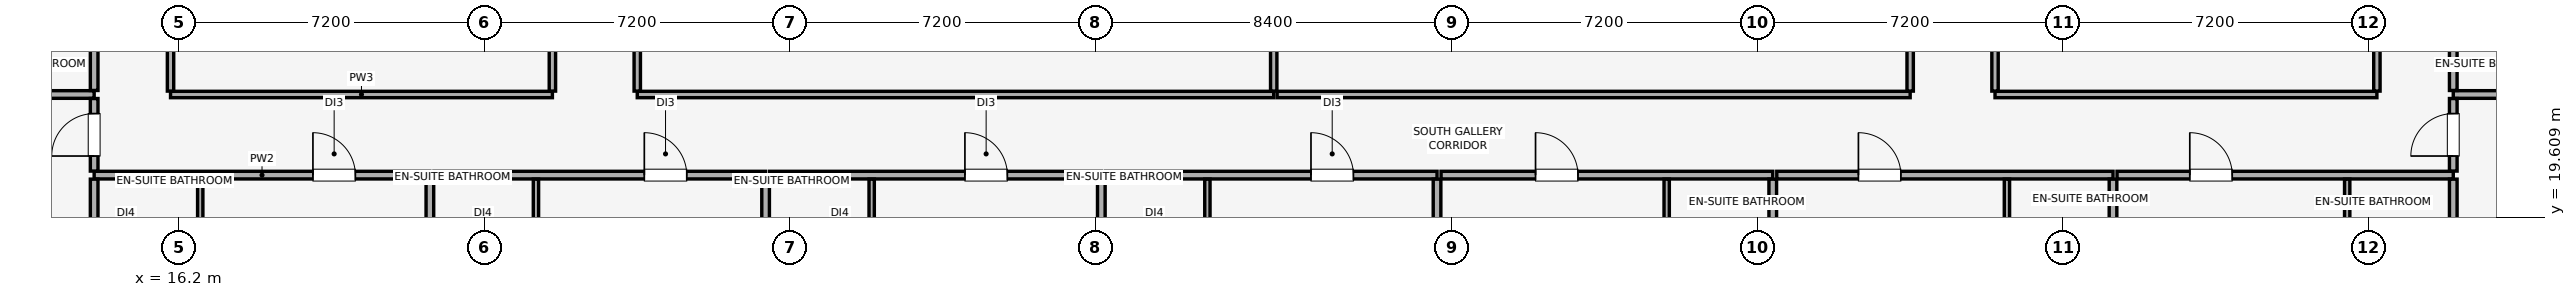
"""IFC4 building model, lengths in metres.
Left out: names, types, materials, properties, quantities, classifications, styles, units other than length and angle.
Written with IfcOpenShell. Run it as: python <this file> out.ifc"""

import sys

from ifc_helpers import new_model, si_unit, direction, frame, frame_2d, origin, place, context, subcontext, project, spatial, rectangle, extrude, element, fill, save


model = new_model("IFC4")
c1 = context("Model", 3, precision=1e-05, world=origin(), true_north=direction((0.0, 1.0)))
c2 = subcontext(c1, "Body", "Model", "MODEL_VIEW")
j1 = project(units=[si_unit("LENGTHUNIT", "METRE"), si_unit("PLANEANGLEUNIT", "RADIAN")], contexts=[c1])
p1 = place(None, origin())
s1 = spatial("IfcSite", under=j1, at=p1, CompositionType="ELEMENT")
p2 = place(p1, origin())
s2 = spatial("IfcBuilding", under=s1, at=p2, CompositionType="ELEMENT")
p3 = place(p2, frame((0.0, 0.0, 180.95)))
s3 = spatial("IfcBuildingStorey", under=s2, at=p3, CompositionType="ELEMENT", Elevation=180.95)
p4 = place(p3, frame((14.2, 20.6, 0.0), z_axis=(0.0, 0.0, 1.0), x_axis=(1.0, 0.0, 0.0)))
e1 = element("IfcWall", 1, at=p4, inside=s3, PredefinedType="PARTITIONING", context=c2, shape_type="SweptSolid", body=[
    extrude(rectangle(XDim=7.912, YDim=0.18, at=frame_2d((3.956, 0.0))), origin(), (0.0, 0.0, 1.0), 3.45),
])
p5 = place(p4, frame((5.156, 0.0, 0.0)))
e2 = element("IfcOpeningElement", 2, at=p5, cuts=e1, PredefinedType="OPENING", context=c2, shape_type="SweptSolid", body=[
    extrude(rectangle(XDim=1.0, YDim=2.15, at=frame_2d((0.5, 1.075))), frame((0.0, 0.1, 0.0), z_axis=(0.0, -1.0, 0.0), x_axis=(1.0, 0.0, 0.0)), (0.0, 0.0, 1.0), 0.2),
])
for number, where, z_axis, x_axis in (
    (3, (14.2, 3.15, 0.0), (0.0, 0.0, 1.0), (0.0, 1.0, 0.0)),
    (4, (22.112, 3.15, 0.0), (0.0, 0.0, 1.0), (0.0, 1.0, 0.0)),
):
    element("IfcWall", number, at=place(p3, frame(where, z_axis=z_axis, x_axis=x_axis)), inside=s3, PredefinedType="PARTITIONING", context=c2, shape_type="SweptSolid", body=[
        extrude(rectangle(XDim=17.355, YDim=0.18, at=frame_2d((8.677, 0.0))), origin(), (0.0, 0.0, 1.0), 3.45),
    ])
p6 = place(p3, frame((16.7, 18.117, 0.0), z_axis=(0.0, 0.0, 1.0), x_axis=(0.0, 1.0, 0.0)))
e5 = element("IfcWall", 5, at=p6, inside=s3, PredefinedType="PARTITIONING", context=c2, shape_type="SweptSolid", body=[
    extrude(rectangle(XDim=2.387, YDim=0.125, at=frame_2d((1.194, 0.0))), origin(), (0.0, 0.0, 1.0), 3.45),
])
p7 = place(p3, frame((22.207, 20.6, 0.0), z_axis=(0.0, 0.0, 1.0), x_axis=(1.0, 0.0, 0.0)))
e6 = element("IfcWall", 6, at=p7, inside=s3, PredefinedType="PARTITIONING", context=c2, shape_type="SweptSolid", body=[
    extrude(rectangle(XDim=7.817, YDim=0.18, at=frame_2d((3.909, 0.0))), origin(), (0.0, 0.0, 1.0), 3.45),
])
p8 = place(p7, frame((4.959, 0.0, 0.0)))
e7 = element("IfcOpeningElement", 7, at=p8, cuts=e6, PredefinedType="OPENING", context=c2, shape_type="SweptSolid", body=[
    extrude(rectangle(XDim=1.0, YDim=2.15, at=frame_2d((0.5, 1.075))), frame((0.0, 0.1, 0.0), z_axis=(0.0, -1.0, 0.0), x_axis=(1.0, 0.0, 0.0)), (0.0, 0.0, 1.0), 0.2),
])
p9 = place(p3, frame((30.025, 3.15, 0.0), z_axis=(0.0, 0.0, 1.0), x_axis=(0.0, 1.0, 0.0)))
e8 = element("IfcWall", 8, at=p9, inside=s3, PredefinedType="PARTITIONING", context=c2, shape_type="SweptSolid", body=[
    extrude(rectangle(XDim=17.355, YDim=0.18, at=frame_2d((8.677, 0.0))), origin(), (0.0, 0.0, 1.0), 3.45),
])
p10 = place(p3, frame((24.612, 18.117, 0.0), z_axis=(0.0, 0.0, 1.0), x_axis=(0.0, 1.0, 0.0)))
e9 = element("IfcWall", 9, at=p10, inside=s3, PredefinedType="PARTITIONING", context=c2, shape_type="SweptSolid", body=[
    extrude(rectangle(XDim=2.387, YDim=0.125, at=frame_2d((1.194, 0.0))), origin(), (0.0, 0.0, 1.0), 3.45),
])
p11 = place(p3, frame((30.12, 20.6, 0.0), z_axis=(0.0, 0.0, 1.0), x_axis=(1.0, 0.0, 0.0)))
e10 = element("IfcWall", 10, at=p11, inside=s3, PredefinedType="PARTITIONING", context=c2, shape_type="SweptSolid", body=[
    extrude(rectangle(XDim=7.817, YDim=0.18, at=frame_2d((3.909, 0.0))), origin(), (0.0, 0.0, 1.0), 3.45),
])
p12 = place(p11, frame((4.603, 0.0, 0.0)))
e11 = element("IfcOpeningElement", 11, at=p12, cuts=e10, PredefinedType="OPENING", context=c2, shape_type="SweptSolid", body=[
    extrude(rectangle(XDim=1.0, YDim=2.15, at=frame_2d((0.5, 1.075))), frame((0.0, 0.1, 0.0), z_axis=(0.0, -1.0, 0.0), x_axis=(1.0, 0.0, 0.0)), (0.0, 0.0, 1.0), 0.2),
])
p13 = place(p3, frame((37.937, 3.15, 0.0), z_axis=(0.0, 0.0, 1.0), x_axis=(0.0, 1.0, 0.0)))
e12 = element("IfcWall", 12, at=p13, inside=s3, PredefinedType="PARTITIONING", context=c2, shape_type="SweptSolid", body=[
    extrude(rectangle(XDim=17.355, YDim=0.18, at=frame_2d((8.677, 0.0))), origin(), (0.0, 0.0, 1.0), 2.85),
])
p14 = place(p3, frame((32.525, 18.117, 0.0), z_axis=(0.0, 0.0, 1.0), x_axis=(0.0, 1.0, 0.0)))
e13 = element("IfcWall", 13, at=p14, inside=s3, PredefinedType="PARTITIONING", context=c2, shape_type="SweptSolid", body=[
    extrude(rectangle(XDim=2.387, YDim=0.125, at=frame_2d((1.194, 0.0))), origin(), (0.0, 0.0, 1.0), 3.45),
])
p15 = place(p3, frame((38.032, 20.6, 0.0), z_axis=(0.0, 0.0, 1.0), x_axis=(1.0, 0.0, 0.0)))
e14 = element("IfcWall", 14, at=p15, inside=s3, PredefinedType="PARTITIONING", context=c2, shape_type="SweptSolid", body=[
    extrude(rectangle(XDim=7.817, YDim=0.18, at=frame_2d((3.909, 0.0))), origin(), (0.0, 0.0, 1.0), 3.45),
])
p16 = place(p15, frame((4.847, 0.0, 0.0)))
e15 = element("IfcOpeningElement", 15, at=p16, cuts=e14, PredefinedType="OPENING", context=c2, shape_type="SweptSolid", body=[
    extrude(rectangle(XDim=1.0, YDim=2.15, at=frame_2d((0.5, 1.075))), frame((0.0, 0.1, 0.0), z_axis=(0.0, -1.0, 0.0), x_axis=(1.0, 0.0, 0.0)), (0.0, 0.0, 1.0), 0.2),
])
p17 = place(p3, frame((45.849, 3.15, 0.0), z_axis=(0.0, 0.0, 1.0), x_axis=(0.0, 1.0, 0.0)))
e16 = element("IfcWall", 16, at=p17, inside=s3, PredefinedType="PARTITIONING", context=c2, shape_type="SweptSolid", body=[
    extrude(rectangle(XDim=17.355, YDim=0.18, at=frame_2d((8.677, 0.0))), origin(), (0.0, 0.0, 1.0), 3.45),
])
p18 = place(p3, frame((40.437, 18.117, 0.0), z_axis=(0.0, 0.0, 1.0), x_axis=(0.0, 1.0, 0.0)))
e17 = element("IfcWall", 17, at=p18, inside=s3, PredefinedType="PARTITIONING", context=c2, shape_type="SweptSolid", body=[
    extrude(rectangle(XDim=2.387, YDim=0.125, at=frame_2d((1.194, 0.0))), origin(), (0.0, 0.0, 1.0), 3.45),
])
p19 = place(p3, frame((45.944, 20.6, 0.0), z_axis=(0.0, 0.0, 1.0), x_axis=(1.0, 0.0, 0.0)))
e18 = element("IfcWall", 18, at=p19, inside=s3, PredefinedType="PARTITIONING", context=c2, shape_type="SweptSolid", body=[
    extrude(rectangle(XDim=7.817, YDim=0.18, at=frame_2d((3.909, 0.0))), origin(), (0.0, 0.0, 1.0), 3.45),
])
p20 = place(p19, frame((2.227, 0.0, 0.0)))
e19 = element("IfcOpeningElement", 19, at=p20, cuts=e18, PredefinedType="OPENING", context=c2, shape_type="SweptSolid", body=[
    extrude(rectangle(XDim=1.0, YDim=2.15, at=frame_2d((0.5, 1.075))), frame((0.0, 0.1, 0.0), z_axis=(0.0, -1.0, 0.0), x_axis=(1.0, 0.0, 0.0)), (0.0, 0.0, 1.0), 0.2),
])
p21 = place(p3, frame((53.761, 3.15, 0.0), z_axis=(0.0, 0.0, 1.0), x_axis=(0.0, 1.0, 0.0)))
e20 = element("IfcWall", 20, at=p21, inside=s3, PredefinedType="PARTITIONING", context=c2, shape_type="SweptSolid", body=[
    extrude(rectangle(XDim=17.355, YDim=0.18, at=frame_2d((8.677, 0.0))), origin(), (0.0, 0.0, 1.0), 3.45),
])
p22 = place(p3, frame((51.261, 18.117, 0.0), z_axis=(0.0, 0.0, 1.0), x_axis=(0.0, 1.0, 0.0)))
e21 = element("IfcWall", 21, at=p22, inside=s3, PredefinedType="PARTITIONING", context=c2, shape_type="SweptSolid", body=[
    extrude(rectangle(XDim=2.387, YDim=0.125, at=frame_2d((1.194, 0.0))), origin(), (0.0, 0.0, 1.0), 3.45),
])
p23 = place(p3, frame((53.856, 20.6, 0.0), z_axis=(0.0, 0.0, 1.0), x_axis=(1.0, 0.0, 0.0)))
e22 = element("IfcWall", 22, at=p23, inside=s3, PredefinedType="PARTITIONING", context=c2, shape_type="SweptSolid", body=[
    extrude(rectangle(XDim=7.924, YDim=0.18, at=frame_2d((3.962, 0.0))), origin(), (0.0, 0.0, 1.0), 3.45),
])
p24 = place(p23, frame((1.924, 0.0, 0.0)))
e23 = element("IfcOpeningElement", 23, at=p24, cuts=e22, PredefinedType="OPENING", context=c2, shape_type="SweptSolid", body=[
    extrude(rectangle(XDim=1.0, YDim=2.15, at=frame_2d((0.5, 1.075))), frame((0.0, 0.1, 0.0), z_axis=(0.0, -1.0, 0.0), x_axis=(1.0, 0.0, 0.0)), (0.0, 0.0, 1.0), 0.2),
])
p25 = place(p3, frame((61.781, 3.15, 0.0), z_axis=(0.0, 0.0, 1.0), x_axis=(0.0, 1.0, 0.0)))
e24 = element("IfcWall", 24, at=p25, inside=s3, PredefinedType="PARTITIONING", context=c2, shape_type="SweptSolid", body=[
    extrude(rectangle(XDim=17.355, YDim=0.18, at=frame_2d((8.677, 0.0))), origin(), (0.0, 0.0, 1.0), 3.45),
])
p26 = place(p3, frame((59.281, 18.117, 0.0), z_axis=(0.0, 0.0, 1.0), x_axis=(0.0, 1.0, 0.0)))
e25 = element("IfcWall", 25, at=p26, inside=s3, PredefinedType="PARTITIONING", context=c2, shape_type="SweptSolid", body=[
    extrude(rectangle(XDim=2.387, YDim=0.125, at=frame_2d((1.194, 0.0))), origin(), (0.0, 0.0, 1.0), 3.45),
])
p27 = place(p3, frame((61.876, 20.6, 0.0), z_axis=(0.0, 0.0, 1.0), x_axis=(1.0, 0.0, 0.0)))
e26 = element("IfcWall", 26, at=p27, inside=s3, PredefinedType="PARTITIONING", context=c2, shape_type="SweptSolid", body=[
    extrude(rectangle(XDim=7.924, YDim=0.18, at=frame_2d((3.962, 0.0))), origin(), (0.0, 0.0, 1.0), 3.45),
])
p28 = place(p27, frame((1.715, 0.0, 0.0)))
e27 = element("IfcOpeningElement", 27, at=p28, cuts=e26, PredefinedType="OPENING", context=c2, shape_type="SweptSolid", body=[
    extrude(rectangle(XDim=1.0, YDim=2.15, at=frame_2d((0.5, 1.075))), frame((0.0, 0.1, 0.0), z_axis=(0.0, -1.0, 0.0), x_axis=(1.0, 0.0, 0.0)), (0.0, 0.0, 1.0), 0.2),
])
p29 = place(p3, frame((69.8, 3.15, 0.0), z_axis=(0.0, 0.0, 1.0), x_axis=(0.0, 1.0, 0.0)))
e28 = element("IfcWall", 28, at=p29, inside=s3, PredefinedType="PARTITIONING", context=c2, shape_type="SweptSolid", body=[
    extrude(rectangle(XDim=17.355, YDim=0.18, at=frame_2d((8.677, 0.0))), origin(), (0.0, 0.0, 1.0), 3.45),
])
p30 = place(p3, frame((67.3, 18.117, 0.0), z_axis=(0.0, 0.0, 1.0), x_axis=(0.0, 1.0, 0.0)))
e29 = element("IfcWall", 29, at=p30, inside=s3, PredefinedType="PARTITIONING", context=c2, shape_type="SweptSolid", body=[
    extrude(rectangle(XDim=2.387, YDim=0.125, at=frame_2d((1.194, 0.0))), origin(), (0.0, 0.0, 1.0), 3.45),
])
p31 = place(p3, frame((3.15, 22.5, 0.0), z_axis=(0.0, 0.0, 1.0), x_axis=(1.0, 0.0, 0.0)))
e30 = element("IfcWall", 30, at=p31, inside=s3, PredefinedType="PARTITIONING", context=c2, shape_type="SweptSolid", body=[
    extrude(rectangle(XDim=11.05, YDim=0.18, at=frame_2d((5.525, 0.0))), origin(), (0.0, 0.0, 1.0), 3.45),
])
p32 = place(p3, frame((14.2, 20.695, 0.0), z_axis=(0.0, 0.0, 1.0), x_axis=(0.0, 1.0, 0.0)))
e31 = element("IfcWall", 31, at=p32, inside=s3, PredefinedType="PARTITIONING", context=c2, shape_type="SweptSolid", body=[
    extrude(rectangle(XDim=1.71, YDim=0.18, at=frame_2d((0.855, 0.0))), origin(), (0.0, 0.0, 1.0), 3.45),
])
p33 = place(p32, frame((0.355, 0.0, 0.0)))
e32 = element("IfcOpeningElement", 32, at=p33, cuts=e31, PredefinedType="OPENING", context=c2, shape_type="SweptSolid", body=[
    extrude(rectangle(XDim=1.0, YDim=2.15, at=frame_2d((0.5, 1.075))), frame((0.0, 0.1, 0.0), z_axis=(0.0, -1.0, 0.0), x_axis=(1.0, 0.0, 0.0)), (0.0, 0.0, 1.0), 0.2),
])
p34 = place(p3, frame((14.2, 22.595, 0.0), z_axis=(0.0, 0.0, 1.0), x_axis=(0.0, 1.0, 0.0)))
e33 = element("IfcWall", 33, at=p34, inside=s3, PredefinedType="PARTITIONING", context=c2, shape_type="SweptSolid", body=[
    extrude(rectangle(XDim=6.71, YDim=0.18, at=frame_2d((3.355, 0.0))), origin(), (0.0, 0.0, 1.0), 3.45),
])
p35 = place(p34, frame((3.94, 0.0, 0.0)))
e34 = element("IfcOpeningElement", 34, at=p35, cuts=e33, PredefinedType="OPENING", context=c2, shape_type="SweptSolid", body=[
    extrude(rectangle(XDim=1.0, YDim=2.15, at=frame_2d((0.5, 1.075))), frame((0.0, 0.1, 0.0), z_axis=(0.0, -1.0, 0.0), x_axis=(1.0, 0.0, 0.0)), (0.0, 0.0, 1.0), 0.2),
])
p36 = place(p3, frame((69.8, 22.5, 0.0), z_axis=(0.0, 0.0, 1.0), x_axis=(1.0, 0.0, 0.0)))
e35 = element("IfcWall", 35, at=p36, inside=s3, PredefinedType="PARTITIONING", context=c2, shape_type="SweptSolid", body=[
    extrude(rectangle(XDim=11.05, YDim=0.18, at=frame_2d((5.525, 0.0))), origin(), (0.0, 0.0, 1.0), 3.45),
])
p37 = place(p3, frame((69.8, 20.695, 0.0), z_axis=(0.0, 0.0, 1.0), x_axis=(0.0, 1.0, 0.0)))
e36 = element("IfcWall", 36, at=p37, inside=s3, PredefinedType="PARTITIONING", context=c2, shape_type="SweptSolid", body=[
    extrude(rectangle(XDim=1.71, YDim=0.18, at=frame_2d((0.855, 0.0))), origin(), (0.0, 0.0, 1.0), 3.45),
])
p38 = place(p37, frame((0.355, 0.0, 0.0)))
e37 = element("IfcOpeningElement", 37, at=p38, cuts=e36, PredefinedType="OPENING", context=c2, shape_type="SweptSolid", body=[
    extrude(rectangle(XDim=1.0, YDim=2.15, at=frame_2d((0.5, 1.075))), frame((0.0, 0.1, 0.0), z_axis=(0.0, -1.0, 0.0), x_axis=(1.0, 0.0, 0.0)), (0.0, 0.0, 1.0), 0.2),
])
p39 = place(p3, frame((69.8, 22.595, 0.0), z_axis=(0.0, 0.0, 1.0), x_axis=(0.0, 1.0, 0.0)))
e38 = element("IfcWall", 38, at=p39, inside=s3, PredefinedType="PARTITIONING", context=c2, shape_type="SweptSolid", body=[
    extrude(rectangle(XDim=6.71, YDim=0.18, at=frame_2d((3.355, 0.0))), origin(), (0.0, 0.0, 1.0), 3.45),
])
p40 = place(p39, frame((3.94, 0.0, 0.0)))
e39 = element("IfcOpeningElement", 39, at=p40, cuts=e38, PredefinedType="OPENING", context=c2, shape_type="SweptSolid", body=[
    extrude(rectangle(XDim=1.0, YDim=2.15, at=frame_2d((0.5, 1.075))), frame((0.0, 0.1, 0.0), z_axis=(0.0, -1.0, 0.0), x_axis=(1.0, 0.0, 0.0)), (0.0, 0.0, 1.0), 0.2),
])
p41 = place(p3, frame((16.0, 22.5, 0.0), z_axis=(0.0, 0.0, 1.0), x_axis=(1.0, 0.0, 0.0)))
e40 = element("IfcWall", 40, at=p41, inside=s3, PredefinedType="PARTITIONING", context=c2, shape_type="SweptSolid", body=[
    extrude(rectangle(XDim=9.0, YDim=0.15, at=frame_2d((4.5, 0.0))), origin(), (0.0, 0.0, 1.0), 3.45),
])
p42 = place(p3, frame((16.0, 22.58, 0.0), z_axis=(0.0, 0.0, 1.0), x_axis=(0.0, 1.0, 0.0)))
e41 = element("IfcWall", 41, at=p42, inside=s3, PredefinedType="PARTITIONING", context=c2, shape_type="SweptSolid", body=[
    extrude(rectangle(XDim=4.54, YDim=0.15, at=frame_2d((2.27, 0.0))), origin(), (0.0, 0.0, 1.0), 2.95),
])
p43 = place(p3, frame((25.0, 22.58, 0.0), z_axis=(0.0, 0.0, 1.0), x_axis=(0.0, 1.0, 0.0)))
e42 = element("IfcWall", 42, at=p43, inside=s3, PredefinedType="PARTITIONING", context=c2, shape_type="SweptSolid", body=[
    extrude(rectangle(XDim=4.54, YDim=0.15, at=frame_2d((2.27, 0.0))), origin(), (0.0, 0.0, 1.0), 3.45),
])
p44 = place(p3, frame((27.0, 22.5, 0.0), z_axis=(0.0, 0.0, 1.0), x_axis=(1.0, 0.0, 0.0)))
e43 = element("IfcWall", 43, at=p44, inside=s3, PredefinedType="PARTITIONING", context=c2, shape_type="SweptSolid", body=[
    extrude(rectangle(XDim=15.0, YDim=0.15, at=frame_2d((7.5, 0.0))), origin(), (0.0, 0.0, 1.0), 3.45),
])
for number, where, z_axis, x_axis in (
    (44, (27.0, 22.58, 0.0), (0.0, 0.0, 1.0), (0.0, 1.0, 0.0)),
    (45, (42.0, 22.58, 0.0), (0.0, 0.0, 1.0), (0.0, 1.0, 0.0)),
):
    element("IfcWall", number, at=place(p3, frame(where, z_axis=z_axis, x_axis=x_axis)), inside=s3, PredefinedType="PARTITIONING", context=c2, shape_type="SweptSolid", body=[
        extrude(rectangle(XDim=4.54, YDim=0.15, at=frame_2d((2.27, 0.0))), origin(), (0.0, 0.0, 1.0), 2.95),
    ])
p45 = place(p3, frame((42.08, 22.5, 0.0), z_axis=(0.0, 0.0, 1.0), x_axis=(1.0, 0.0, 0.0)))
e46 = element("IfcWall", 46, at=p45, inside=s3, PredefinedType="PARTITIONING", context=c2, shape_type="SweptSolid", body=[
    extrude(rectangle(XDim=14.92, YDim=0.15, at=frame_2d((7.46, 0.0))), origin(), (0.0, 0.0, 1.0), 3.45),
])
p46 = place(p3, frame((57.0, 22.58, 0.0), z_axis=(0.0, 0.0, 1.0), x_axis=(0.0, 1.0, 0.0)))
e47 = element("IfcWall", 47, at=p46, inside=s3, PredefinedType="PARTITIONING", context=c2, shape_type="SweptSolid", body=[
    extrude(rectangle(XDim=4.54, YDim=0.15, at=frame_2d((2.27, 0.0))), origin(), (0.0, 0.0, 1.0), 2.95),
])
p47 = place(p3, frame((59.0, 22.5, 0.0), z_axis=(0.0, 0.0, 1.0), x_axis=(1.0, 0.0, 0.0)))
e48 = element("IfcWall", 48, at=p47, inside=s3, PredefinedType="PARTITIONING", context=c2, shape_type="SweptSolid", body=[
    extrude(rectangle(XDim=9.0, YDim=0.15, at=frame_2d((4.5, 0.0))), origin(), (0.0, 0.0, 1.0), 3.45),
])
p48 = place(p3, frame((59.0, 22.58, 0.0), z_axis=(0.0, 0.0, 1.0), x_axis=(0.0, 1.0, 0.0)))
e49 = element("IfcWall", 49, at=p48, inside=s3, PredefinedType="PARTITIONING", context=c2, shape_type="SweptSolid", body=[
    extrude(rectangle(XDim=4.54, YDim=0.15, at=frame_2d((2.27, 0.0))), origin(), (0.0, 0.0, 1.0), 3.45),
])
p49 = place(p3, frame((68.0, 22.58, 0.0), z_axis=(0.0, 0.0, 1.0), x_axis=(0.0, 1.0, 0.0)))
e50 = element("IfcWall", 50, at=p49, inside=s3, PredefinedType="PARTITIONING", context=c2, shape_type="SweptSolid", body=[
    extrude(rectangle(XDim=4.54, YDim=0.15, at=frame_2d((2.27, 0.0))), origin(), (0.0, 0.0, 1.0), 2.95),
])
p50 = place(p5, origin())
e51 = element("IfcDoor", 51, at=p50, inside=s3, OperationType="SINGLE_SWING_LEFT", PredefinedType="DOOR", context=c2, shape_type="SweptSolid", body=[
    extrude(rectangle(XDim=1.0, YDim=2.15, at=frame_2d((0.5, 1.075))), frame((0.0, 0.025, 0.0), z_axis=(0.0, -1.0, 0.0), x_axis=(1.0, 0.0, 0.0)), (0.0, 0.0, 1.0), 0.05),
])
fill(e2, e51)
p51 = place(p8, origin())
e52 = element("IfcDoor", 52, at=p51, inside=s3, OperationType="SINGLE_SWING_LEFT", PredefinedType="DOOR", context=c2, shape_type="SweptSolid", body=[
    extrude(rectangle(XDim=1.0, YDim=2.15, at=frame_2d((0.5, 1.075))), frame((0.0, 0.025, 0.0), z_axis=(0.0, -1.0, 0.0), x_axis=(1.0, 0.0, 0.0)), (0.0, 0.0, 1.0), 0.05),
])
fill(e7, e52)
p52 = place(p12, origin())
e53 = element("IfcDoor", 53, at=p52, inside=s3, OperationType="SINGLE_SWING_LEFT", PredefinedType="DOOR", context=c2, shape_type="SweptSolid", body=[
    extrude(rectangle(XDim=1.0, YDim=2.15, at=frame_2d((0.5, 1.075))), frame((0.0, 0.025, 0.0), z_axis=(0.0, -1.0, 0.0), x_axis=(1.0, 0.0, 0.0)), (0.0, 0.0, 1.0), 0.05),
])
fill(e11, e53)
p53 = place(p16, origin())
e54 = element("IfcDoor", 54, at=p53, inside=s3, OperationType="SINGLE_SWING_LEFT", PredefinedType="DOOR", context=c2, shape_type="SweptSolid", body=[
    extrude(rectangle(XDim=1.0, YDim=2.15, at=frame_2d((0.5, 1.075))), frame((0.0, 0.025, 0.0), z_axis=(0.0, -1.0, 0.0), x_axis=(1.0, 0.0, 0.0)), (0.0, 0.0, 1.0), 0.05),
])
fill(e15, e54)
p54 = place(p20, origin())
e55 = element("IfcDoor", 55, at=p54, inside=s3, OperationType="SINGLE_SWING_LEFT", PredefinedType="DOOR", context=c2, shape_type="SweptSolid", body=[
    extrude(rectangle(XDim=1.0, YDim=2.15, at=frame_2d((0.5, 1.075))), frame((0.0, 0.025, 0.0), z_axis=(0.0, -1.0, 0.0), x_axis=(1.0, 0.0, 0.0)), (0.0, 0.0, 1.0), 0.05),
])
fill(e19, e55)
p55 = place(p24, origin())
e56 = element("IfcDoor", 56, at=p55, inside=s3, OperationType="SINGLE_SWING_LEFT", PredefinedType="DOOR", context=c2, shape_type="SweptSolid", body=[
    extrude(rectangle(XDim=1.0, YDim=2.15, at=frame_2d((0.5, 1.075))), frame((0.0, 0.025, 0.0), z_axis=(0.0, -1.0, 0.0), x_axis=(1.0, 0.0, 0.0)), (0.0, 0.0, 1.0), 0.05),
])
fill(e23, e56)
p56 = place(p28, origin())
e57 = element("IfcDoor", 57, at=p56, inside=s3, OperationType="SINGLE_SWING_LEFT", PredefinedType="DOOR", context=c2, shape_type="SweptSolid", body=[
    extrude(rectangle(XDim=1.0, YDim=2.15, at=frame_2d((0.5, 1.075))), frame((0.0, 0.025, 0.0), z_axis=(0.0, -1.0, 0.0), x_axis=(1.0, 0.0, 0.0)), (0.0, 0.0, 1.0), 0.05),
])
fill(e27, e57)
p57 = place(p33, origin())
e58 = element("IfcDoor", 58, at=p57, inside=s3, OperationType="SINGLE_SWING_LEFT", PredefinedType="DOOR", context=c2, shape_type="SweptSolid", body=[
    extrude(rectangle(XDim=1.0, YDim=2.15, at=frame_2d((0.5, 1.075))), frame((0.0, 0.025, 0.0), z_axis=(0.0, -1.0, 0.0), x_axis=(1.0, 0.0, 0.0)), (0.0, 0.0, 1.0), 0.05),
])
fill(e32, e58)
p58 = place(p38, origin())
e59 = element("IfcDoor", 59, at=p58, inside=s3, OperationType="SINGLE_SWING_LEFT", PredefinedType="DOOR", context=c2, shape_type="SweptSolid", body=[
    extrude(rectangle(XDim=1.0, YDim=2.15, at=frame_2d((0.5, 1.075))), frame((0.0, 0.025, 0.0), z_axis=(0.0, -1.0, 0.0), x_axis=(1.0, 0.0, 0.0)), (0.0, 0.0, 1.0), 0.05),
])
fill(e37, e59)
save(model, sys.argv[1])
